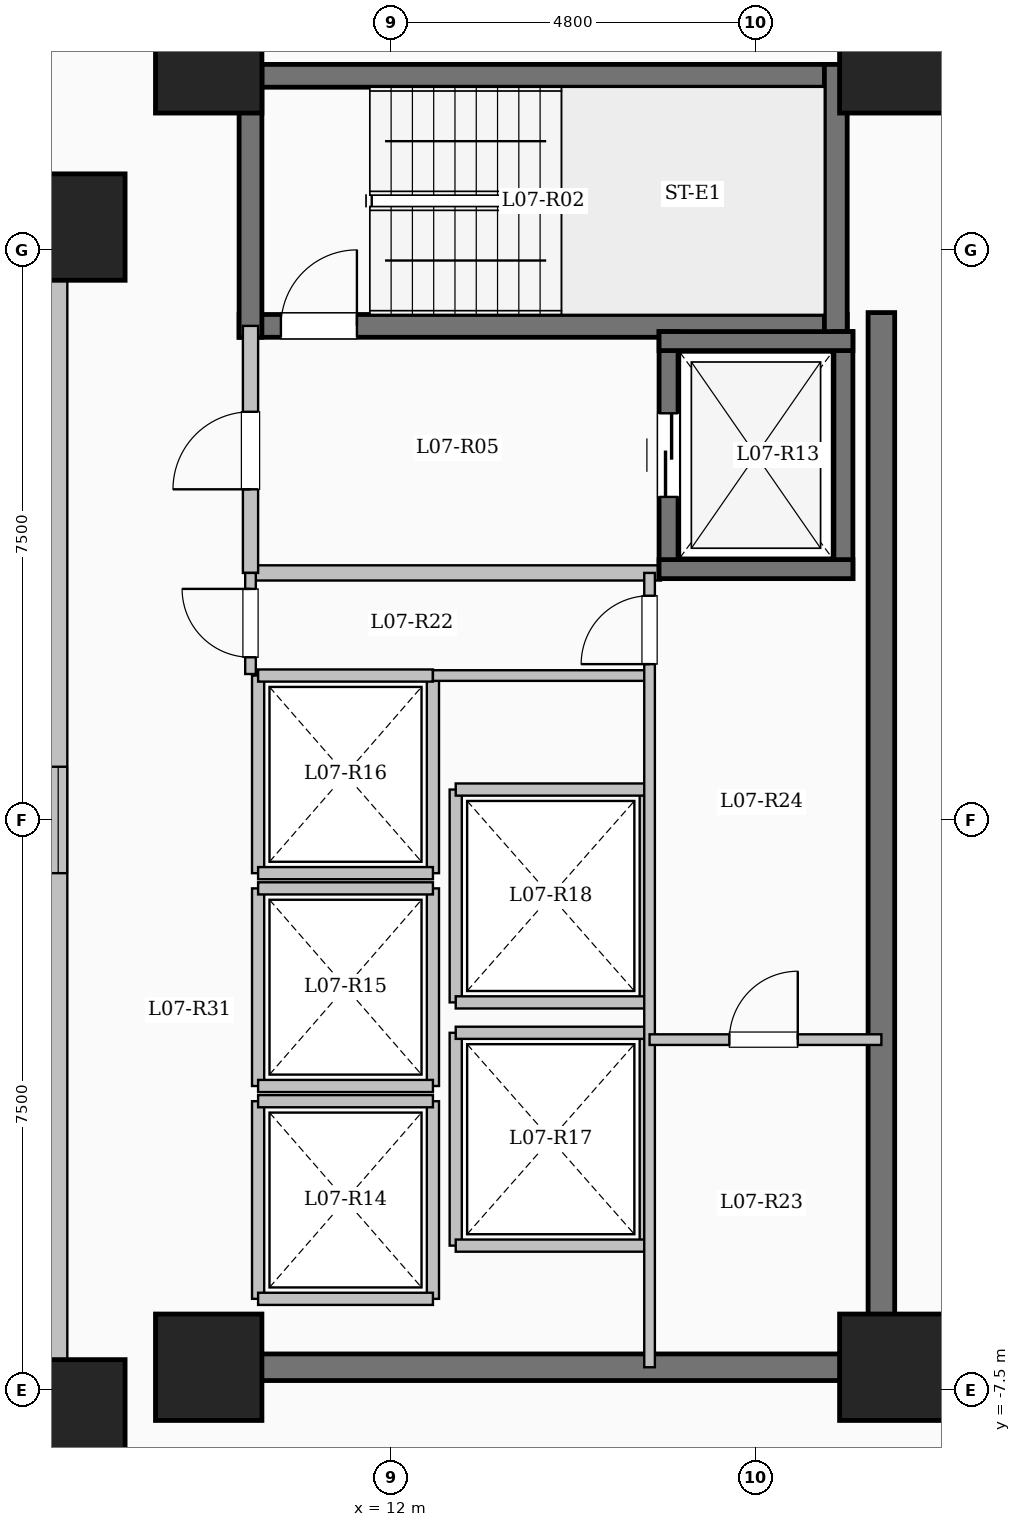
"""IFC4 building model, lengths in metres.
Left out: names, types, materials, properties, quantities, classifications, styles, units other than length and angle.
Written with IfcOpenShell. Run it as: python <this file> out.ifc"""

import sys

from ifc_helpers import new_model, si_unit, direction, frame, frame_2d, origin, origin_2d, place, context, subcontext, project, spatial, rectangle, extrude, element, fill, save


model = new_model("IFC4")
c1 = context("Model", 3, precision=1e-05, world=origin(), true_north=direction((0.0, 1.0)))
c2 = subcontext(c1, "Body", "Model", "MODEL_VIEW")
j1 = project(units=[si_unit("LENGTHUNIT", "METRE"), si_unit("PLANEANGLEUNIT", "RADIAN")], contexts=[c1])
p1 = place(None, origin())
s1 = spatial("IfcSite", under=j1, at=p1, CompositionType="ELEMENT")
p2 = place(p1, origin())
s2 = spatial("IfcBuilding", under=s1, at=p2, CompositionType="ELEMENT")
p3 = place(p2, frame((0.0, 0.0, 30.7)))
s3 = spatial("IfcBuildingStorey", under=s2, at=p3, CompositionType="ELEMENT", Elevation=30.7)
for number, where, z_axis, x_axis in (
    (1, (7.8, -7.8, 0.0), (0.0, 0.0, 1.0), (1.0, 0.0, 0.0)),
    (2, (7.8, 7.8, 0.0), (0.0, 0.0, 1.0), (1.0, 0.0, 0.0)),
    (3, (9.6, -7.2, 0.0), (0.0, 0.0, 1.0), (1.0, 0.0, 0.0)),
    (4, (9.6, 10.0, 0.0), (0.0, 0.0, 1.0), (1.0, 0.0, 0.0)),
    (5, (18.6, -7.2, 0.0), (0.0, 0.0, 1.0), (1.0, 0.0, 0.0)),
    (6, (18.6, 10.0, 0.0), (0.0, 0.0, 1.0), (1.0, 0.0, 0.0)),
):
    element("IfcColumn", number, at=place(p3, frame(where, z_axis=z_axis, x_axis=x_axis)), inside=s3, PredefinedType="COLUMN", context=c2, shape_type="SweptSolid", body=[
        extrude(rectangle(XDim=1.4, YDim=1.4, at=origin_2d()), origin(), (0.0, 0.0, 1.0), 3.35),
    ])
p4 = place(p3, frame((-7.62, -7.62, 0.0), z_axis=(0.0, 0.0, 1.0), x_axis=(1.0, 0.0, 0.0)))
e7 = element("IfcWall", 7, at=p4, inside=s3, PredefinedType="SOLIDWALL", context=c2, shape_type="SweptSolid", body=[
    extrude(rectangle(XDim=15.24, YDim=0.24, at=frame_2d((7.62, 0.0))), origin(), (0.0, 0.0, 1.0), 3.1),
])
p5 = place(p4, frame((6.92, 0.0, 0.95)))
e8 = element("IfcOpeningElement", 8, at=p5, cuts=e7, PredefinedType="OPENING", context=c2, shape_type="SweptSolid", body=[
    extrude(rectangle(XDim=1.4, YDim=1.5, at=frame_2d((0.7, 0.75))), frame((0.0, 0.13, 0.0), z_axis=(0.0, -1.0, 0.0), x_axis=(1.0, 0.0, 0.0)), (0.0, 0.0, 1.0), 0.26),
])
p6 = place(p3, frame((7.62, -7.62, 0.0), z_axis=(0.0, 0.0, 1.0), x_axis=(0.0, 1.0, 0.0)))
e9 = element("IfcWall", 9, at=p6, inside=s3, PredefinedType="SOLIDWALL", context=c2, shape_type="SweptSolid", body=[
    extrude(rectangle(XDim=15.24, YDim=0.24, at=frame_2d((7.62, 0.0))), origin(), (0.0, 0.0, 1.0), 3.1),
])
p7 = place(p6, frame((6.92, 0.0, 0.95)))
e10 = element("IfcOpeningElement", 10, at=p7, cuts=e9, PredefinedType="OPENING", context=c2, shape_type="SweptSolid", body=[
    extrude(rectangle(XDim=1.4, YDim=1.5, at=frame_2d((0.7, 0.75))), frame((0.0, 0.13, 0.0), z_axis=(0.0, -1.0, 0.0), x_axis=(1.0, 0.0, 0.0)), (0.0, 0.0, 1.0), 0.26),
])
p8 = place(p3, frame((7.62, 7.62, 0.0), z_axis=(0.0, 0.0, 1.0), x_axis=(-1.0, 0.0, 0.0)))
e11 = element("IfcWall", 11, at=p8, inside=s3, PredefinedType="SOLIDWALL", context=c2, shape_type="SweptSolid", body=[
    extrude(rectangle(XDim=15.24, YDim=0.24, at=frame_2d((7.62, 0.0))), origin(), (0.0, 0.0, 1.0), 3.1),
])
p9 = place(p8, frame((6.92, 0.0, 0.95)))
e12 = element("IfcOpeningElement", 12, at=p9, cuts=e11, PredefinedType="OPENING", context=c2, shape_type="SweptSolid", body=[
    extrude(rectangle(XDim=1.4, YDim=1.5, at=frame_2d((0.7, 0.75))), frame((0.0, 0.13, 0.0), z_axis=(0.0, -1.0, 0.0), x_axis=(1.0, 0.0, 0.0)), (0.0, 0.0, 1.0), 0.26),
])
p10 = place(p3, frame((10.0, 9.79, 0.0), z_axis=(0.0, 0.0, 1.0), x_axis=(1.0, 0.0, 0.0)))
e13 = element("IfcWall", 13, at=p10, inside=s3, PredefinedType="SHEAR", context=c2, shape_type="SweptSolid", body=[
    extrude(rectangle(XDim=8.0, YDim=0.3, at=frame_2d((4.0, 0.0))), origin(), (0.0, 0.0, 1.0), 3.35),
])
p11 = place(p3, frame((10.0, 6.5, 0.0), z_axis=(0.0, 0.0, 1.0), x_axis=(1.0, 0.0, 0.0)))
e14 = element("IfcWall", 14, at=p11, inside=s3, PredefinedType="SHEAR", context=c2, shape_type="SweptSolid", body=[
    extrude(rectangle(XDim=8.0, YDim=0.3, at=frame_2d((4.0, 0.0))), origin(), (0.0, 0.0, 1.0), 3.35),
])
p12 = place(p11, frame((0.55, 0.0, 0.0)))
e15 = element("IfcOpeningElement", 15, at=p12, cuts=e14, PredefinedType="OPENING", context=c2, shape_type="SweptSolid", body=[
    extrude(rectangle(XDim=1.0, YDim=2.15, at=frame_2d((0.5, 1.075))), frame((0.0, 0.16, 0.0), z_axis=(0.0, -1.0, 0.0), x_axis=(1.0, 0.0, 0.0)), (0.0, 0.0, 1.0), 0.32),
])
for number, where, z_axis, x_axis in (
    (16, (10.15, 6.35, 0.0), (0.0, 0.0, 1.0), (0.0, 1.0, 0.0)),
    (17, (17.85, 6.35, 0.0), (0.0, 0.0, 1.0), (0.0, 1.0, 0.0)),
):
    element("IfcWall", number, at=place(p3, frame(where, z_axis=z_axis, x_axis=x_axis)), inside=s3, PredefinedType="SHEAR", context=c2, shape_type="SweptSolid", body=[
        extrude(rectangle(XDim=3.59, YDim=0.3, at=frame_2d((1.795, 0.0))), origin(), (0.0, 0.0, 1.0), 3.35),
    ])
p13 = place(p3, frame((10.15, 3.25, 0.0), z_axis=(0.0, 0.0, 1.0), x_axis=(1.0, 0.0, 0.0)))
e18 = element("IfcWall", 18, at=p13, inside=s3, PredefinedType="SOLIDWALL", context=c2, shape_type="SweptSolid", body=[
    extrude(rectangle(XDim=5.4, YDim=0.2, at=frame_2d((2.7, 0.0))), origin(), (0.0, 0.0, 1.0), 3.1),
])
p14 = place(p3, frame((10.15, 3.25, 0.0), z_axis=(0.0, 0.0, 1.0), x_axis=(0.0, 1.0, 0.0)))
e19 = element("IfcWall", 19, at=p14, inside=s3, PredefinedType="SOLIDWALL", context=c2, shape_type="SweptSolid", body=[
    extrude(rectangle(XDim=3.25, YDim=0.2, at=frame_2d((1.625, 0.0))), origin(), (0.0, 0.0, 1.0), 3.1),
])
p15 = place(p14, frame((1.1, 0.0, 0.0)))
e20 = element("IfcOpeningElement", 20, at=p15, cuts=e19, PredefinedType="OPENING", context=c2, shape_type="SweptSolid", body=[
    extrude(rectangle(XDim=1.02, YDim=2.15, at=frame_2d((0.51, 1.075))), frame((0.0, 0.11, 0.0), z_axis=(0.0, -1.0, 0.0), x_axis=(1.0, 0.0, 0.0)), (0.0, 0.0, 1.0), 0.22),
])
p16 = place(p3, frame((15.65, 3.175, 0.0), z_axis=(0.0, 0.0, 1.0), x_axis=(0.0, 1.0, 0.0)))
e21 = element("IfcWall", 21, at=p16, inside=s3, PredefinedType="SHEAR", context=c2, shape_type="SweptSolid", body=[
    extrude(rectangle(XDim=3.25, YDim=0.25, at=frame_2d((1.625, 0.0))), origin(), (0.0, 0.0, 1.0), 3.35),
])
p17 = place(p16, frame((1.075, 0.0, 0.0)))
e22 = element("IfcOpeningElement", 22, at=p17, cuts=e21, PredefinedType="OPENING", context=c2, shape_type="SweptSolid", body=[
    extrude(rectangle(XDim=1.1, YDim=2.15, at=frame_2d((0.55, 1.075))), frame((0.0, 0.135, 0.0), z_axis=(0.0, -1.0, 0.0), x_axis=(1.0, 0.0, 0.0)), (0.0, 0.0, 1.0), 0.27),
])
p18 = place(p3, frame((17.95, 3.175, 0.0), z_axis=(0.0, 0.0, 1.0), x_axis=(0.0, 1.0, 0.0)))
e23 = element("IfcWall", 23, at=p18, inside=s3, PredefinedType="SHEAR", context=c2, shape_type="SweptSolid", body=[
    extrude(rectangle(XDim=3.25, YDim=0.25, at=frame_2d((1.625, 0.0))), origin(), (0.0, 0.0, 1.0), 3.35),
])
for number, where, z_axis, x_axis in (
    (24, (15.525, 3.3, 0.0), (0.0, 0.0, 1.0), (1.0, 0.0, 0.0)),
    (25, (15.525, 6.3, 0.0), (0.0, 0.0, 1.0), (1.0, 0.0, 0.0)),
):
    element("IfcWall", number, at=place(p3, frame(where, z_axis=z_axis, x_axis=x_axis)), inside=s3, PredefinedType="SHEAR", context=c2, shape_type="SweptSolid", body=[
        extrude(rectangle(XDim=2.55, YDim=0.25, at=frame_2d((1.275, 0.0))), origin(), (0.0, 0.0, 1.0), 3.35),
    ])
for number, where, z_axis, x_axis in (
    (26, (10.25, -6.3, 0.0), (0.0, 0.0, 1.0), (0.0, 1.0, 0.0)),
    (27, (12.55, -6.3, 0.0), (0.0, 0.0, 1.0), (0.0, 1.0, 0.0)),
):
    element("IfcWall", number, at=place(p3, frame(where, z_axis=z_axis, x_axis=x_axis)), inside=s3, PredefinedType="SOLIDWALL", context=c2, shape_type="SweptSolid", body=[
        extrude(rectangle(XDim=2.6, YDim=0.16, at=frame_2d((1.3, 0.0))), origin(), (0.0, 0.0, 1.0), 3.1),
    ])
for number, where, z_axis, x_axis in (
    (28, (10.25, -6.3, 0.0), (0.0, 0.0, 1.0), (1.0, 0.0, 0.0)),
    (29, (10.25, -3.7, 0.0), (0.0, 0.0, 1.0), (1.0, 0.0, 0.0)),
):
    element("IfcWall", number, at=place(p3, frame(where, z_axis=z_axis, x_axis=x_axis)), inside=s3, PredefinedType="SOLIDWALL", context=c2, shape_type="SweptSolid", body=[
        extrude(rectangle(XDim=2.3, YDim=0.16, at=frame_2d((1.15, 0.0))), origin(), (0.0, 0.0, 1.0), 3.1),
    ])
for number, where, z_axis, x_axis in (
    (30, (10.25, -3.5, 0.0), (0.0, 0.0, 1.0), (0.0, 1.0, 0.0)),
    (31, (12.55, -3.5, 0.0), (0.0, 0.0, 1.0), (0.0, 1.0, 0.0)),
):
    element("IfcWall", number, at=place(p3, frame(where, z_axis=z_axis, x_axis=x_axis)), inside=s3, PredefinedType="SOLIDWALL", context=c2, shape_type="SweptSolid", body=[
        extrude(rectangle(XDim=2.6, YDim=0.16, at=frame_2d((1.3, 0.0))), origin(), (0.0, 0.0, 1.0), 3.1),
    ])
for number, where, z_axis, x_axis in (
    (32, (10.25, -3.5, 0.0), (0.0, 0.0, 1.0), (1.0, 0.0, 0.0)),
    (33, (10.25, -0.9, 0.0), (0.0, 0.0, 1.0), (1.0, 0.0, 0.0)),
):
    element("IfcWall", number, at=place(p3, frame(where, z_axis=z_axis, x_axis=x_axis)), inside=s3, PredefinedType="SOLIDWALL", context=c2, shape_type="SweptSolid", body=[
        extrude(rectangle(XDim=2.3, YDim=0.16, at=frame_2d((1.15, 0.0))), origin(), (0.0, 0.0, 1.0), 3.1),
    ])
for number, where, z_axis, x_axis in (
    (34, (10.25, -0.7, 0.0), (0.0, 0.0, 1.0), (0.0, 1.0, 0.0)),
    (35, (12.55, -0.7, 0.0), (0.0, 0.0, 1.0), (0.0, 1.0, 0.0)),
):
    element("IfcWall", number, at=place(p3, frame(where, z_axis=z_axis, x_axis=x_axis)), inside=s3, PredefinedType="SOLIDWALL", context=c2, shape_type="SweptSolid", body=[
        extrude(rectangle(XDim=2.6, YDim=0.16, at=frame_2d((1.3, 0.0))), origin(), (0.0, 0.0, 1.0), 3.1),
    ])
for number, where, z_axis, x_axis in (
    (36, (10.25, -0.7, 0.0), (0.0, 0.0, 1.0), (1.0, 0.0, 0.0)),
    (37, (10.25, 1.9, 0.0), (0.0, 0.0, 1.0), (1.0, 0.0, 0.0)),
):
    element("IfcWall", number, at=place(p3, frame(where, z_axis=z_axis, x_axis=x_axis)), inside=s3, PredefinedType="SOLIDWALL", context=c2, shape_type="SweptSolid", body=[
        extrude(rectangle(XDim=2.3, YDim=0.16, at=frame_2d((1.15, 0.0))), origin(), (0.0, 0.0, 1.0), 3.1),
    ])
for number, where, z_axis, x_axis in (
    (38, (12.85, -5.6, 0.0), (0.0, 0.0, 1.0), (0.0, 1.0, 0.0)),
    (39, (15.35, -5.6, 0.0), (0.0, 0.0, 1.0), (0.0, 1.0, 0.0)),
):
    element("IfcWall", number, at=place(p3, frame(where, z_axis=z_axis, x_axis=x_axis)), inside=s3, PredefinedType="SOLIDWALL", context=c2, shape_type="SweptSolid", body=[
        extrude(rectangle(XDim=2.8, YDim=0.16, at=frame_2d((1.4, 0.0))), origin(), (0.0, 0.0, 1.0), 3.1),
    ])
for number, where, z_axis, x_axis in (
    (40, (12.85, -5.6, 0.0), (0.0, 0.0, 1.0), (1.0, 0.0, 0.0)),
    (41, (12.85, -2.8, 0.0), (0.0, 0.0, 1.0), (1.0, 0.0, 0.0)),
):
    element("IfcWall", number, at=place(p3, frame(where, z_axis=z_axis, x_axis=x_axis)), inside=s3, PredefinedType="SOLIDWALL", context=c2, shape_type="SweptSolid", body=[
        extrude(rectangle(XDim=2.5, YDim=0.16, at=frame_2d((1.25, 0.0))), origin(), (0.0, 0.0, 1.0), 3.1),
    ])
for number, where, z_axis, x_axis in (
    (42, (12.85, -2.4, 0.0), (0.0, 0.0, 1.0), (0.0, 1.0, 0.0)),
    (43, (15.35, -2.4, 0.0), (0.0, 0.0, 1.0), (0.0, 1.0, 0.0)),
):
    element("IfcWall", number, at=place(p3, frame(where, z_axis=z_axis, x_axis=x_axis)), inside=s3, PredefinedType="SOLIDWALL", context=c2, shape_type="SweptSolid", body=[
        extrude(rectangle(XDim=2.8, YDim=0.16, at=frame_2d((1.4, 0.0))), origin(), (0.0, 0.0, 1.0), 3.1),
    ])
for number, where, z_axis, x_axis in (
    (44, (12.85, -2.4, 0.0), (0.0, 0.0, 1.0), (1.0, 0.0, 0.0)),
    (45, (12.85, 0.4, 0.0), (0.0, 0.0, 1.0), (1.0, 0.0, 0.0)),
):
    element("IfcWall", number, at=place(p3, frame(where, z_axis=z_axis, x_axis=x_axis)), inside=s3, PredefinedType="SOLIDWALL", context=c2, shape_type="SweptSolid", body=[
        extrude(rectangle(XDim=2.5, YDim=0.16, at=frame_2d((1.25, 0.0))), origin(), (0.0, 0.0, 1.0), 3.1),
    ])
p19 = place(p3, frame((18.45, -7.375, 0.0), z_axis=(0.0, 0.0, 1.0), x_axis=(0.0, 1.0, 0.0)))
e46 = element("IfcWall", 46, at=p19, inside=s3, PredefinedType="SHEAR", context=c2, shape_type="SweptSolid", body=[
    extrude(rectangle(XDim=14.05, YDim=0.35, at=frame_2d((7.025, 0.0))), origin(), (0.0, 0.0, 1.0), 3.35),
])
p20 = place(p3, frame((10.075, -7.2, 0.0), z_axis=(0.0, 0.0, 1.0), x_axis=(1.0, 0.0, 0.0)))
e47 = element("IfcWall", 47, at=p20, inside=s3, PredefinedType="SHEAR", context=c2, shape_type="SweptSolid", body=[
    extrude(rectangle(XDim=8.55, YDim=0.35, at=frame_2d((4.275, 0.0))), origin(), (0.0, 0.0, 1.0), 3.35),
])
p21 = place(p3, frame((12.55, 1.9, 0.0), z_axis=(0.0, 0.0, 1.0), x_axis=(1.0, 0.0, 0.0)))
e48 = element("IfcWall", 48, at=p21, inside=s3, PredefinedType="PARTITIONING", context=c2, shape_type="SweptSolid", body=[
    extrude(rectangle(XDim=2.85, YDim=0.14, at=frame_2d((1.425, 0.0))), origin(), (0.0, 0.0, 1.0), 3.1),
])
p22 = place(p3, frame((10.15, 1.92, 0.0), z_axis=(0.0, 0.0, 1.0), x_axis=(0.0, 1.0, 0.0)))
e49 = element("IfcWall", 49, at=p22, inside=s3, PredefinedType="PARTITIONING", context=c2, shape_type="SweptSolid", body=[
    extrude(rectangle(XDim=1.33, YDim=0.14, at=frame_2d((0.665, 0.0))), origin(), (0.0, 0.0, 1.0), 3.1),
])
p23 = place(p22, frame((0.22, 0.0, 0.0)))
e50 = element("IfcOpeningElement", 50, at=p23, cuts=e49, PredefinedType="OPENING", context=c2, shape_type="SweptSolid", body=[
    extrude(rectangle(XDim=0.9, YDim=2.08, at=frame_2d((0.45, 1.04))), frame((0.0, 0.08, 0.0), z_axis=(0.0, -1.0, 0.0), x_axis=(1.0, 0.0, 0.0)), (0.0, 0.0, 1.0), 0.16),
])
p24 = place(p3, frame((15.4, -7.2, 0.0), z_axis=(0.0, 0.0, 1.0), x_axis=(0.0, 1.0, 0.0)))
e51 = element("IfcWall", 51, at=p24, inside=s3, PredefinedType="PARTITIONING", context=c2, shape_type="SweptSolid", body=[
    extrude(rectangle(XDim=10.45, YDim=0.14, at=frame_2d((5.225, 0.0))), origin(), (0.0, 0.0, 1.0), 3.1),
])
p25 = place(p24, frame((9.25, 0.0, 0.0)))
e52 = element("IfcOpeningElement", 52, at=p25, cuts=e51, PredefinedType="OPENING", context=c2, shape_type="SweptSolid", body=[
    extrude(rectangle(XDim=0.9, YDim=2.08, at=frame_2d((0.45, 1.04))), frame((0.0, 0.08, 0.0), z_axis=(0.0, -1.0, 0.0), x_axis=(1.0, 0.0, 0.0)), (0.0, 0.0, 1.0), 0.16),
])
p26 = place(p3, frame((15.4, -2.89, 0.0), z_axis=(0.0, 0.0, 1.0), x_axis=(1.0, 0.0, 0.0)))
e53 = element("IfcWall", 53, at=p26, inside=s3, PredefinedType="PARTITIONING", context=c2, shape_type="SweptSolid", body=[
    extrude(rectangle(XDim=3.05, YDim=0.14, at=frame_2d((1.525, 0.0))), origin(), (0.0, 0.0, 1.0), 3.1),
])
p27 = place(p26, frame((1.05, 0.0, 0.0)))
e54 = element("IfcOpeningElement", 54, at=p27, cuts=e53, PredefinedType="OPENING", context=c2, shape_type="SweptSolid", body=[
    extrude(rectangle(XDim=0.9, YDim=2.08, at=frame_2d((0.45, 1.04))), frame((0.0, 0.08, 0.0), z_axis=(0.0, -1.0, 0.0), x_axis=(1.0, 0.0, 0.0)), (0.0, 0.0, 1.0), 0.16),
])
p28 = place(p7, origin())
e55 = element("IfcWindow", 55, at=p28, inside=s3, PartitioningType="SINGLE_PANEL", PredefinedType="WINDOW", context=c2, shape_type="SweptSolid", body=[
    extrude(rectangle(XDim=1.4, YDim=1.5, at=frame_2d((0.7, 0.75))), frame((0.0, 0.03, 0.0), z_axis=(0.0, -1.0, 0.0), x_axis=(1.0, 0.0, 0.0)), (0.0, 0.0, 1.0), 0.06),
])
fill(e10, e55)
p29 = place(p12, origin())
e56 = element("IfcDoor", 56, at=p29, inside=s3, OperationType="SINGLE_SWING_RIGHT", PredefinedType="DOOR", context=c2, shape_type="SweptSolid", body=[
    extrude(rectangle(XDim=1.0, YDim=2.15, at=frame_2d((0.5, 1.075))), frame((0.0, 0.025, 0.0), z_axis=(0.0, -1.0, 0.0), x_axis=(1.0, 0.0, 0.0)), (0.0, 0.0, 1.0), 0.05),
])
fill(e15, e56)
p30 = place(p15, origin())
e57 = element("IfcDoor", 57, at=p30, inside=s3, OperationType="SINGLE_SWING_LEFT", PredefinedType="DOOR", context=c2, shape_type="SweptSolid", body=[
    extrude(rectangle(XDim=1.02, YDim=2.15, at=frame_2d((0.51, 1.075))), frame((0.0, 0.025, 0.0), z_axis=(0.0, -1.0, 0.0), x_axis=(1.0, 0.0, 0.0)), (0.0, 0.0, 1.0), 0.05),
])
fill(e20, e57)
p31 = place(p17, origin())
e58 = element("IfcDoor", 58, at=p31, inside=s3, OperationType="SLIDING_TO_LEFT", PredefinedType="DOOR", context=c2, shape_type="SweptSolid", body=[
    extrude(rectangle(XDim=1.1, YDim=2.15, at=frame_2d((0.55, 1.075))), frame((0.0, 0.025, 0.0), z_axis=(0.0, -1.0, 0.0), x_axis=(1.0, 0.0, 0.0)), (0.0, 0.0, 1.0), 0.05),
])
fill(e22, e58)
p32 = place(p23, origin())
e59 = element("IfcDoor", 59, at=p32, inside=s3, OperationType="SINGLE_SWING_RIGHT", PredefinedType="DOOR", context=c2, shape_type="SweptSolid", body=[
    extrude(rectangle(XDim=0.9, YDim=2.08, at=frame_2d((0.45, 1.04))), frame((0.0, 0.025, 0.0), z_axis=(0.0, -1.0, 0.0), x_axis=(1.0, 0.0, 0.0)), (0.0, 0.0, 1.0), 0.05),
])
fill(e50, e59)
p33 = place(p25, origin())
e60 = element("IfcDoor", 60, at=p33, inside=s3, OperationType="SINGLE_SWING_LEFT", PredefinedType="DOOR", context=c2, shape_type="SweptSolid", body=[
    extrude(rectangle(XDim=0.9, YDim=2.08, at=frame_2d((0.45, 1.04))), frame((0.0, 0.025, 0.0), z_axis=(0.0, -1.0, 0.0), x_axis=(1.0, 0.0, 0.0)), (0.0, 0.0, 1.0), 0.05),
])
fill(e52, e60)
p34 = place(p27, origin())
e61 = element("IfcDoor", 61, at=p34, inside=s3, OperationType="SINGLE_SWING_RIGHT", PredefinedType="DOOR", context=c2, shape_type="SweptSolid", body=[
    extrude(rectangle(XDim=0.9, YDim=2.08, at=frame_2d((0.45, 1.04))), frame((0.0, 0.025, 0.0), z_axis=(0.0, -1.0, 0.0), x_axis=(1.0, 0.0, 0.0)), (0.0, 0.0, 1.0), 0.05),
])
fill(e54, e61)
save(model, sys.argv[1])
